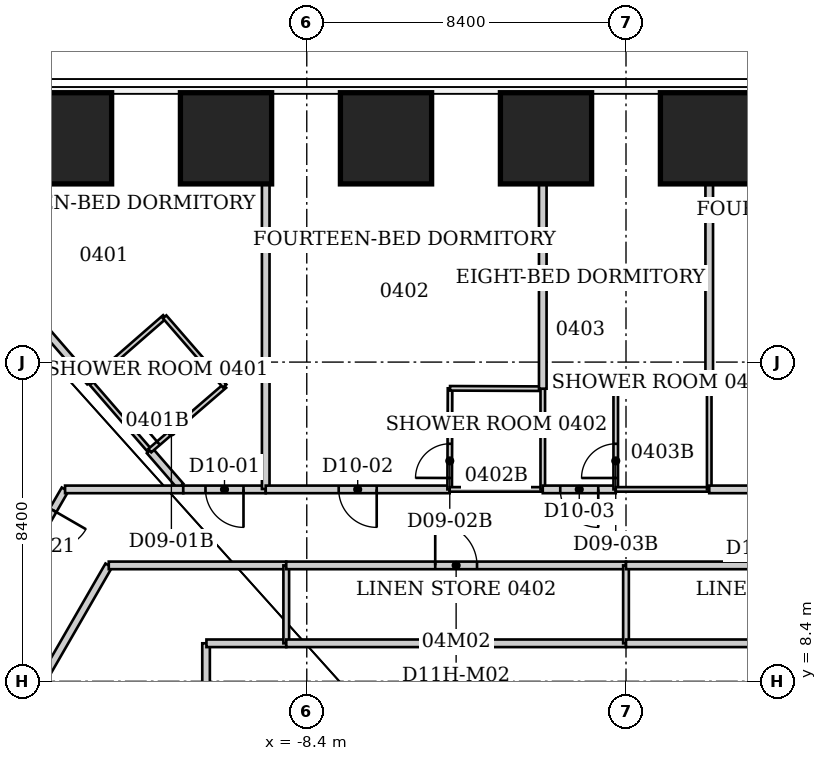
"""IFC4 building model, lengths in metres.
Left out: names, types, materials, properties, quantities, classifications, styles, units other than length and angle.
Written with IfcOpenShell. Run it as: python <this file> out.ifc"""

import sys

from ifc_helpers import new_model, si_unit, direction, frame, frame_2d, origin, origin_2d, place, context, subcontext, project, spatial, rectangle, extrude, element, fill, save


model = new_model("IFC4")
c1 = context("Model", 3, precision=1e-05, world=origin(), true_north=direction((0.0, 1.0)))
c2 = subcontext(c1, "Body", "Model", "MODEL_VIEW")
j1 = project(units=[si_unit("LENGTHUNIT", "METRE"), si_unit("PLANEANGLEUNIT", "RADIAN")], contexts=[c1])
p1 = place(None, origin())
s1 = spatial("IfcSite", under=j1, at=p1, CompositionType="ELEMENT")
p2 = place(p1, origin())
s2 = spatial("IfcBuilding", under=s1, at=p2, CompositionType="ELEMENT")
p3 = place(p2, frame((0.0, 0.0, 23.0)))
s3 = spatial("IfcBuildingStorey", under=s2, at=p3, CompositionType="ELEMENT", Elevation=23.0)
for number, where, z_axis, x_axis in (
    (1, (-14.735, 22.689, 0.0), (0.0, 0.0, 1.0), (0.0, 1.0, 0.0)),
    (2, (-10.525, 22.689, 0.0), (0.0, 0.0, 1.0), (0.0, 1.0, 0.0)),
    (3, (-6.315, 22.689, 0.0), (0.0, 0.0, 1.0), (0.0, 1.0, 0.0)),
    (4, (-2.105, 22.689, 0.0), (0.0, 0.0, 1.0), (0.0, 1.0, 0.0)),
    (5, (2.105, 22.689, 0.0), (0.0, 0.0, 1.0), (0.0, 1.0, 0.0)),
):
    element("IfcColumn", number, at=place(p3, frame(where, z_axis=z_axis, x_axis=x_axis)), inside=s3, PredefinedType="COLUMN", context=c2, shape_type="SweptSolid", body=[
        extrude(rectangle(XDim=2.4, YDim=2.4, at=origin_2d()), origin(), (0.0, 0.0, 1.0), 3.8),
    ])
p4 = place(p3, frame((-20.4, 23.547, 0.0), z_axis=(0.0, 0.0, 1.0), x_axis=(0.654910244559, -0.755706670323, 0.0)))
e6 = element("IfcWall", 6, at=p4, inside=s3, PredefinedType="PARTITIONING", context=c2, shape_type="SweptSolid", body=[
    extrude(rectangle(XDim=9.618, YDim=0.2, at=frame_2d((4.809, 0.0))), origin(), (0.0, 0.0, 1.0), 3.64),
])
p5 = place(p3, frame((-17.87, 4.06, 0.0), z_axis=(0.0, 0.0, 1.0), x_axis=(0.499424260127, 0.866357552282, 0.0)))
e7 = element("IfcWall", 7, at=p5, inside=s3, PredefinedType="PARTITIONING", context=c2, shape_type="SweptSolid", body=[
    extrude(rectangle(XDim=8.53, YDim=0.2, at=frame_2d((4.265, 0.0))), origin(), (0.0, 0.0, 1.0), 3.64),
])
p6 = place(p3, frame((-16.892, 9.756, 0.0), z_axis=(0.0, 0.0, 1.0), x_axis=(0.499894213467, 0.866086471054, 0.0)))
e8 = element("IfcWall", 8, at=p6, inside=s3, PredefinedType="PARTITIONING", context=c2, shape_type="SweptSolid", body=[
    extrude(rectangle(XDim=4.266, YDim=0.2, at=frame_2d((2.133, 0.0))), origin(), (0.0, 0.0, 1.0), 3.64),
])
p7 = place(p6, frame((2.633, 0.0, 0.0)))
e9 = element("IfcOpeningElement", 9, at=p7, cuts=e8, PredefinedType="OPENING", context=c2, shape_type="SweptSolid", body=[
    extrude(rectangle(XDim=1.0, YDim=2.13, at=frame_2d((0.5, 1.065))), frame((0.0, 0.1, 0.0), z_axis=(0.0, -1.0, 0.0), x_axis=(1.0, 0.0, 0.0)), (0.0, 0.0, 1.0), 0.2),
])
p8 = place(p3, frame((-14.101, 16.279, 0.0), z_axis=(0.0, 0.0, 1.0), x_axis=(0.654868469202, -0.755742871647, 0.0)))
e10 = element("IfcWall", 10, at=p8, inside=s3, PredefinedType="PARTITIONING", context=c2, shape_type="SweptSolid", body=[
    extrude(rectangle(XDim=2.396, YDim=0.12, at=frame_2d((1.198, 0.0))), origin(), (0.0, 0.0, 1.0), 3.64),
])
p9 = place(p3, frame((-13.61, 11.45, 0.0), z_axis=(0.0, 0.0, 1.0), x_axis=(1.0, 0.0, 0.0)))
e11 = element("IfcWall", 11, at=p9, inside=s3, PredefinedType="PARTITIONING", context=c2, shape_type="SweptSolid", body=[
    extrude(rectangle(XDim=4.67, YDim=0.2, at=frame_2d((2.335, 0.0))), origin(), (0.0, 0.0, 1.0), 3.64),
])
p10 = place(p3, frame((-12.532, 14.468, 0.0), z_axis=(0.0, 0.0, 1.0), x_axis=(0.654877937884, -0.755734666714, 0.0)))
e12 = element("IfcWall", 12, at=p10, inside=s3, PredefinedType="PARTITIONING", context=c2, shape_type="SweptSolid", body=[
    extrude(rectangle(XDim=1.237, YDim=0.2, at=frame_2d((0.619, 0.0))), origin(), (0.0, 0.0, 1.0), 3.64),
])
p11 = place(p3, frame((-12.53, 14.47, 0.0), z_axis=(0.0, 0.0, 1.0), x_axis=(0.757086659925, 0.653314464377, 0.0)))
e13 = element("IfcWall", 13, at=p11, inside=s3, PredefinedType="PARTITIONING", context=c2, shape_type="SweptSolid", body=[
    extrude(rectangle(XDim=2.602, YDim=0.12, at=frame_2d((1.301, 0.0))), origin(), (0.0, 0.0, 1.0), 3.64),
])
p12 = place(p11, frame((0.3, 0.0, 0.0)))
e14 = element("IfcOpeningElement", 14, at=p12, cuts=e13, PredefinedType="OPENING", context=c2, shape_type="SweptSolid", body=[
    extrude(rectangle(XDim=0.9, YDim=2.03, at=frame_2d((0.45, 1.015))), frame((0.0, 0.06, 0.0), z_axis=(0.0, -1.0, 0.0), x_axis=(1.0, 0.0, 0.0)), (0.0, 0.0, 1.0), 0.12),
])
p13 = place(p3, frame((-12.14, 17.99, 0.0), z_axis=(0.0, 0.0, 1.0), x_axis=(-0.753570046386, -0.657367617996, 0.0)))
e15 = element("IfcWall", 15, at=p13, inside=s3, PredefinedType="PARTITIONING", context=c2, shape_type="SweptSolid", body=[
    extrude(rectangle(XDim=2.601, YDim=0.12, at=frame_2d((1.301, 0.0))), origin(), (0.0, 0.0, 1.0), 3.64),
])
p14 = place(p3, frame((-11.65, 13.45, 0.0), z_axis=(0.0, 0.0, 1.0), x_axis=(-1.0, 0.0, 0.0)))
e16 = element("IfcWall", 16, at=p14, inside=s3, PredefinedType="PARTITIONING", context=c2, shape_type="SweptSolid", body=[
    extrude(rectangle(XDim=3.11, YDim=0.2, at=frame_2d((1.555, 0.0))), origin(), (0.0, 0.0, 1.0), 3.64),
])
p15 = place(p3, frame((-11.05, 9.4, 0.0), z_axis=(0.0, 0.0, 1.0), x_axis=(0.0, -1.0, 0.0)))
e17 = element("IfcWall", 17, at=p15, inside=s3, PredefinedType="PARTITIONING", context=c2, shape_type="SweptSolid", body=[
    extrude(rectangle(XDim=17.16, YDim=0.2, at=frame_2d((8.58, 0.0))), origin(), (0.0, 0.0, 1.0), 3.64),
])
p16 = place(p15, frame((8.03, 0.0, 0.0)))
e18 = element("IfcOpeningElement", 18, at=p16, cuts=e17, PredefinedType="OPENING", context=c2, shape_type="SweptSolid", body=[
    extrude(rectangle(XDim=1.1, YDim=2.2, at=frame_2d((0.55, 1.1))), frame((0.0, 0.1, 0.0), z_axis=(0.0, -1.0, 0.0), x_axis=(1.0, 0.0, 0.0)), (0.0, 0.0, 1.0), 0.2),
])
p17 = place(p3, frame((-10.56, 16.17, 0.0), z_axis=(0.0, 0.0, 1.0), x_axis=(-0.65550883331, 0.755187506155, 0.0)))
e19 = element("IfcWall", 19, at=p17, inside=s3, PredefinedType="PARTITIONING", context=c2, shape_type="SweptSolid", body=[
    extrude(rectangle(XDim=2.41, YDim=0.12, at=frame_2d((1.205, 0.0))), origin(), (0.0, 0.0, 1.0), 3.64),
])
p18 = place(p3, frame((-9.48, 13.45, 0.0), z_axis=(0.0, 0.0, 1.0), x_axis=(-1.0, 0.0, 0.0)))
e20 = element("IfcWall", 20, at=p18, inside=s3, PredefinedType="PARTITIONING", context=c2, shape_type="SweptSolid", body=[
    extrude(rectangle(XDim=2.17, YDim=0.2, at=frame_2d((1.085, 0.0))), origin(), (0.0, 0.0, 1.0), 3.64),
])
p19 = place(p18, frame((0.585, 0.0, 0.0)))
e21 = element("IfcOpeningElement", 21, at=p19, cuts=e20, PredefinedType="OPENING", context=c2, shape_type="SweptSolid", body=[
    extrude(rectangle(XDim=1.0, YDim=2.13, at=frame_2d((0.5, 1.065))), frame((0.0, 0.1, 0.0), z_axis=(0.0, -1.0, 0.0), x_axis=(1.0, 0.0, 0.0)), (0.0, 0.0, 1.0), 0.2),
])
p20 = place(p3, frame((-9.48, 23.92, 0.0), z_axis=(0.0, 0.0, 1.0), x_axis=(0.0, -1.0, 0.0)))
e22 = element("IfcWall", 22, at=p20, inside=s3, PredefinedType="PARTITIONING", context=c2, shape_type="SweptSolid", body=[
    extrude(rectangle(XDim=10.46, YDim=0.2, at=frame_2d((5.23, 0.0))), origin(), (0.0, 0.0, 1.0), 3.64),
])
p21 = place(p3, frame((-8.94, 9.4, 0.0), z_axis=(0.0, 0.0, 1.0), x_axis=(-1.0, 0.0, 0.0)))
e23 = element("IfcWall", 23, at=p21, inside=s3, PredefinedType="PARTITIONING", context=c2, shape_type="SweptSolid", body=[
    extrude(rectangle(XDim=2.1, YDim=0.2, at=frame_2d((1.05, 0.0))), origin(), (0.0, 0.0, 1.0), 3.64),
])
p22 = place(p3, frame((-8.94, 11.45, 0.0), z_axis=(0.0, 0.0, 1.0), x_axis=(0.0, -1.0, 0.0)))
e24 = element("IfcWall", 24, at=p22, inside=s3, PredefinedType="PARTITIONING", context=c2, shape_type="SweptSolid", body=[
    extrude(rectangle(XDim=2.05, YDim=0.15, at=frame_2d((1.025, 0.0))), origin(), (0.0, 0.0, 1.0), 3.64),
])
p23 = place(p3, frame((-8.94, 11.45, 0.0), z_axis=(0.0, 0.0, 1.0), x_axis=(1.0, 0.0, 0.0)))
e25 = element("IfcWall", 25, at=p23, inside=s3, PredefinedType="PARTITIONING", context=c2, shape_type="SweptSolid", body=[
    extrude(rectangle(XDim=8.94, YDim=0.2, at=frame_2d((4.47, 0.0))), origin(), (0.0, 0.0, 1.0), 3.64),
])
p24 = place(p23, frame((3.92, 0.0, 0.0)))
e26 = element("IfcOpeningElement", 26, at=p24, cuts=e25, PredefinedType="OPENING", context=c2, shape_type="SweptSolid", body=[
    extrude(rectangle(XDim=1.1, YDim=2.2, at=frame_2d((0.55, 1.1))), frame((0.0, 0.1, 0.0), z_axis=(0.0, -1.0, 0.0), x_axis=(1.0, 0.0, 0.0)), (0.0, 0.0, 1.0), 0.2),
])
p25 = place(p3, frame((-4.64, 13.45, 0.0), z_axis=(0.0, 0.0, 1.0), x_axis=(-1.0, 0.0, 0.0)))
e27 = element("IfcWall", 27, at=p25, inside=s3, PredefinedType="PARTITIONING", context=c2, shape_type="SweptSolid", body=[
    extrude(rectangle(XDim=4.84, YDim=0.2, at=frame_2d((2.42, 0.0))), origin(), (0.0, 0.0, 1.0), 3.64),
])
p26 = place(p25, frame((1.92, 0.0, 0.0)))
e28 = element("IfcOpeningElement", 28, at=p26, cuts=e27, PredefinedType="OPENING", context=c2, shape_type="SweptSolid", body=[
    extrude(rectangle(XDim=1.0, YDim=2.13, at=frame_2d((0.5, 1.065))), frame((0.0, 0.1, 0.0), z_axis=(0.0, -1.0, 0.0), x_axis=(1.0, 0.0, 0.0)), (0.0, 0.0, 1.0), 0.2),
])
p27 = place(p3, frame((-4.63, 16.11, 0.0), z_axis=(0.0, 0.0, 1.0), x_axis=(-0.003762822113, -0.99999292056, 0.0)))
e29 = element("IfcWall", 29, at=p27, inside=s3, PredefinedType="PARTITIONING", context=c2, shape_type="SweptSolid", body=[
    extrude(rectangle(XDim=2.66, YDim=0.12, at=frame_2d((1.33, 0.0))), origin(), (0.0, 0.0, 1.0), 3.64),
])
p28 = place(p27, frame((1.46, 0.0, 0.0)))
e30 = element("IfcOpeningElement", 30, at=p28, cuts=e29, PredefinedType="OPENING", context=c2, shape_type="SweptSolid", body=[
    extrude(rectangle(XDim=0.9, YDim=2.03, at=frame_2d((0.45, 1.015))), frame((0.0, 0.06, 0.0), z_axis=(0.0, -1.0, 0.0), x_axis=(1.0, 0.0, 0.0)), (0.0, 0.0, 1.0), 0.12),
])
p29 = place(p3, frame((-2.19, 13.45, 0.0), z_axis=(0.0, 0.0, 1.0), x_axis=(-1.0, 0.0, 0.0)))
e31 = element("IfcWall", 31, at=p29, inside=s3, PredefinedType="PARTITIONING", context=c2, shape_type="SweptSolid", body=[
    extrude(rectangle(XDim=2.45, YDim=0.12, at=frame_2d((1.225, 0.0))), origin(), (0.0, 0.0, 1.0), 3.64),
])
p30 = place(p3, frame((-2.19, 16.1, 0.0), z_axis=(0.0, 0.0, 1.0), x_axis=(-0.999991585011, 0.004102426955, 0.0)))
e32 = element("IfcWall", 32, at=p30, inside=s3, PredefinedType="PARTITIONING", context=c2, shape_type="SweptSolid", body=[
    extrude(rectangle(XDim=2.44, YDim=0.12, at=frame_2d((1.22, 0.0))), origin(), (0.0, 0.0, 1.0), 3.64),
])
p31 = place(p3, frame((-2.19, 16.1, 0.0), z_axis=(0.0, 0.0, 1.0), x_axis=(0.0, -1.0, 0.0)))
e33 = element("IfcWall", 33, at=p31, inside=s3, PredefinedType="PARTITIONING", context=c2, shape_type="SweptSolid", body=[
    extrude(rectangle(XDim=2.65, YDim=0.12, at=frame_2d((1.325, 0.0))), origin(), (0.0, 0.0, 1.0), 2.878),
])
p32 = place(p3, frame((-2.19, 23.83, 0.0), z_axis=(0.0, 0.0, 1.0), x_axis=(0.0, -1.0, 0.0)))
e34 = element("IfcWall", 34, at=p32, inside=s3, PredefinedType="PARTITIONING", context=c2, shape_type="SweptSolid", body=[
    extrude(rectangle(XDim=7.73, YDim=0.2, at=frame_2d((3.865, 0.0))), origin(), (0.0, 0.0, 1.0), 2.878),
])
p33 = place(p3, frame((-0.27, 13.45, 0.0), z_axis=(0.0, 0.0, 1.0), x_axis=(-1.0, 0.0, 0.0)))
e35 = element("IfcWall", 35, at=p33, inside=s3, PredefinedType="PARTITIONING", context=c2, shape_type="SweptSolid", body=[
    extrude(rectangle(XDim=1.92, YDim=0.2, at=frame_2d((0.96, 0.0))), origin(), (0.0, 0.0, 1.0), 3.64),
])
p34 = place(p33, frame((0.46, 0.0, 0.0)))
e36 = element("IfcOpeningElement", 36, at=p34, cuts=e35, PredefinedType="OPENING", context=c2, shape_type="SweptSolid", body=[
    extrude(rectangle(XDim=1.0, YDim=2.13, at=frame_2d((0.5, 1.065))), frame((0.0, 0.1, 0.0), z_axis=(0.0, -1.0, 0.0), x_axis=(1.0, 0.0, 0.0)), (0.0, 0.0, 1.0), 0.2),
])
p35 = place(p3, frame((-0.27, 16.12, 0.0), z_axis=(0.0, 0.0, 1.0), x_axis=(0.0, -1.0, 0.0)))
e37 = element("IfcWall", 37, at=p35, inside=s3, PredefinedType="PARTITIONING", context=c2, shape_type="SweptSolid", body=[
    extrude(rectangle(XDim=2.67, YDim=0.12, at=frame_2d((1.335, 0.0))), origin(), (0.0, 0.0, 1.0), 3.64),
])
p36 = place(p35, frame((1.47, 0.0, 0.0)))
e38 = element("IfcOpeningElement", 38, at=p36, cuts=e37, PredefinedType="OPENING", context=c2, shape_type="SweptSolid", body=[
    extrude(rectangle(XDim=0.9, YDim=2.03, at=frame_2d((0.45, 1.015))), frame((0.0, 0.06, 0.0), z_axis=(0.0, -1.0, 0.0), x_axis=(1.0, 0.0, 0.0)), (0.0, 0.0, 1.0), 0.12),
])
p37 = place(p3, frame((0.0, 9.4, 0.0), z_axis=(0.0, 0.0, 1.0), x_axis=(-1.0, 0.0, 0.0)))
e39 = element("IfcWall", 39, at=p37, inside=s3, PredefinedType="PARTITIONING", context=c2, shape_type="SweptSolid", body=[
    extrude(rectangle(XDim=8.94, YDim=0.2, at=frame_2d((4.47, 0.0))), origin(), (0.0, 0.0, 1.0), 3.64),
])
p38 = place(p3, frame((0.0, 11.45, 0.0), z_axis=(0.0, 0.0, 1.0), x_axis=(0.0, -1.0, 0.0)))
e40 = element("IfcWall", 40, at=p38, inside=s3, PredefinedType="PARTITIONING", context=c2, shape_type="SweptSolid", body=[
    extrude(rectangle(XDim=2.05, YDim=0.15, at=frame_2d((1.025, 0.0))), origin(), (0.0, 0.0, 1.0), 2.878),
])
p39 = place(p3, frame((0.0, 11.45, 0.0), z_axis=(0.0, 0.0, 1.0), x_axis=(1.0, 0.0, 0.0)))
e41 = element("IfcWall", 41, at=p39, inside=s3, PredefinedType="PARTITIONING", context=c2, shape_type="SweptSolid", body=[
    extrude(rectangle(XDim=8.94, YDim=0.2, at=frame_2d((4.47, 0.0))), origin(), (0.0, 0.0, 1.0), 3.64),
])
p40 = place(p39, frame((3.92, 0.0, 0.0)))
e42 = element("IfcOpeningElement", 42, at=p40, cuts=e41, PredefinedType="OPENING", context=c2, shape_type="SweptSolid", body=[
    extrude(rectangle(XDim=1.1, YDim=2.2, at=frame_2d((0.55, 1.1))), frame((0.0, 0.1, 0.0), z_axis=(0.0, -1.0, 0.0), x_axis=(1.0, 0.0, 0.0)), (0.0, 0.0, 1.0), 0.2),
])
for number, where, z_axis, x_axis in (
    (43, (2.19, 13.45, 0.0), (0.0, 0.0, 1.0), (-1.0, 0.0, 0.0)),
    (44, (2.19, 16.12, 0.0), (0.0, 0.0, 1.0), (-1.0, 0.0, 0.0)),
):
    element("IfcWall", number, at=place(p3, frame(where, z_axis=z_axis, x_axis=x_axis)), inside=s3, PredefinedType="PARTITIONING", context=c2, shape_type="SweptSolid", body=[
        extrude(rectangle(XDim=2.46, YDim=0.12, at=frame_2d((1.23, 0.0))), origin(), (0.0, 0.0, 1.0), 3.64),
    ])
p41 = place(p3, frame((2.19, 16.12, 0.0), z_axis=(0.0, 0.0, 1.0), x_axis=(0.0, -1.0, 0.0)))
e45 = element("IfcWall", 45, at=p41, inside=s3, PredefinedType="PARTITIONING", context=c2, shape_type="SweptSolid", body=[
    extrude(rectangle(XDim=2.67, YDim=0.12, at=frame_2d((1.335, 0.0))), origin(), (0.0, 0.0, 1.0), 2.878),
])
p42 = place(p3, frame((2.19, 23.83, 0.0), z_axis=(0.0, 0.0, 1.0), x_axis=(0.0, -1.0, 0.0)))
e46 = element("IfcWall", 46, at=p42, inside=s3, PredefinedType="PARTITIONING", context=c2, shape_type="SweptSolid", body=[
    extrude(rectangle(XDim=7.71, YDim=0.2, at=frame_2d((3.855, 0.0))), origin(), (0.0, 0.0, 1.0), 2.878),
])
p43 = place(p3, frame((7.03, 13.45, 0.0), z_axis=(0.0, 0.0, 1.0), x_axis=(-1.0, 0.0, 0.0)))
e47 = element("IfcWall", 47, at=p43, inside=s3, PredefinedType="PARTITIONING", context=c2, shape_type="SweptSolid", body=[
    extrude(rectangle(XDim=4.84, YDim=0.2, at=frame_2d((2.42, 0.0))), origin(), (0.0, 0.0, 1.0), 3.64),
])
p44 = place(p43, frame((1.92, 0.0, 0.0)))
e48 = element("IfcOpeningElement", 48, at=p44, cuts=e47, PredefinedType="OPENING", context=c2, shape_type="SweptSolid", body=[
    extrude(rectangle(XDim=1.0, YDim=2.13, at=frame_2d((0.5, 1.065))), frame((0.0, 0.1, 0.0), z_axis=(0.0, -1.0, 0.0), x_axis=(1.0, 0.0, 0.0)), (0.0, 0.0, 1.0), 0.2),
])
p45 = place(p3, frame((8.94, 9.4, 0.0), z_axis=(0.0, 0.0, 1.0), x_axis=(-1.0, 0.0, 0.0)))
e49 = element("IfcWall", 49, at=p45, inside=s3, PredefinedType="PARTITIONING", context=c2, shape_type="SweptSolid", body=[
    extrude(rectangle(XDim=8.94, YDim=0.2, at=frame_2d((4.47, 0.0))), origin(), (0.0, 0.0, 1.0), 3.64),
])
p46 = place(p19, origin())
e50 = element("IfcDoor", 50, at=p46, inside=s3, OperationType="SINGLE_SWING_LEFT", PredefinedType="DOOR", context=c2, shape_type="SweptSolid", body=[
    extrude(rectangle(XDim=1.0, YDim=2.13, at=frame_2d((0.5, 1.065))), frame((0.0, 0.025, 0.0), z_axis=(0.0, -1.0, 0.0), x_axis=(1.0, 0.0, 0.0)), (0.0, 0.0, 1.0), 0.05),
])
fill(e21, e50)
p47 = place(p12, origin())
e51 = element("IfcDoor", 51, at=p47, inside=s3, OperationType="SINGLE_SWING_LEFT", PredefinedType="DOOR", context=c2, shape_type="SweptSolid", body=[
    extrude(rectangle(XDim=0.9, YDim=2.03, at=frame_2d((0.45, 1.015))), frame((0.0, 0.025, 0.0), z_axis=(0.0, -1.0, 0.0), x_axis=(1.0, 0.0, 0.0)), (0.0, 0.0, 1.0), 0.05),
])
fill(e14, e51)
p48 = place(p26, origin())
e52 = element("IfcDoor", 52, at=p48, inside=s3, OperationType="SINGLE_SWING_LEFT", PredefinedType="DOOR", context=c2, shape_type="SweptSolid", body=[
    extrude(rectangle(XDim=1.0, YDim=2.13, at=frame_2d((0.5, 1.065))), frame((0.0, 0.025, 0.0), z_axis=(0.0, -1.0, 0.0), x_axis=(1.0, 0.0, 0.0)), (0.0, 0.0, 1.0), 0.05),
])
fill(e28, e52)
p49 = place(p28, origin())
e53 = element("IfcDoor", 53, at=p49, inside=s3, OperationType="SINGLE_SWING_RIGHT", PredefinedType="DOOR", context=c2, shape_type="SweptSolid", body=[
    extrude(rectangle(XDim=0.9, YDim=2.03, at=frame_2d((0.45, 1.015))), frame((0.0, 0.025, 0.0), z_axis=(0.0, -1.0, 0.0), x_axis=(1.0, 0.0, 0.0)), (0.0, 0.0, 1.0), 0.05),
])
fill(e30, e53)
p50 = place(p34, origin())
e54 = element("IfcDoor", 54, at=p50, inside=s3, OperationType="SINGLE_SWING_LEFT", PredefinedType="DOOR", context=c2, shape_type="SweptSolid", body=[
    extrude(rectangle(XDim=1.0, YDim=2.13, at=frame_2d((0.5, 1.065))), frame((0.0, 0.025, 0.0), z_axis=(0.0, -1.0, 0.0), x_axis=(1.0, 0.0, 0.0)), (0.0, 0.0, 1.0), 0.05),
])
fill(e36, e54)
p51 = place(p36, origin())
e55 = element("IfcDoor", 55, at=p51, inside=s3, OperationType="SINGLE_SWING_RIGHT", PredefinedType="DOOR", context=c2, shape_type="SweptSolid", body=[
    extrude(rectangle(XDim=0.9, YDim=2.03, at=frame_2d((0.45, 1.015))), frame((0.0, 0.025, 0.0), z_axis=(0.0, -1.0, 0.0), x_axis=(1.0, 0.0, 0.0)), (0.0, 0.0, 1.0), 0.05),
])
fill(e38, e55)
p52 = place(p7, origin())
e56 = element("IfcDoor", 56, at=p52, inside=s3, OperationType="SINGLE_SWING_RIGHT", PredefinedType="DOOR", context=c2, shape_type="SweptSolid", body=[
    extrude(rectangle(XDim=1.0, YDim=2.13, at=frame_2d((0.5, 1.065))), frame((0.0, 0.025, 0.0), z_axis=(0.0, -1.0, 0.0), x_axis=(1.0, 0.0, 0.0)), (0.0, 0.0, 1.0), 0.05),
])
fill(e9, e56)
p53 = place(p24, origin())
e57 = element("IfcDoor", 57, at=p53, inside=s3, OperationType="SINGLE_SWING_LEFT", PredefinedType="DOOR", context=c2, shape_type="SweptSolid", body=[
    extrude(rectangle(XDim=1.1, YDim=2.2, at=frame_2d((0.55, 1.1))), frame((0.0, 0.025, 0.0), z_axis=(0.0, -1.0, 0.0), x_axis=(1.0, 0.0, 0.0)), (0.0, 0.0, 1.0), 0.05),
])
fill(e26, e57)
save(model, sys.argv[1])
